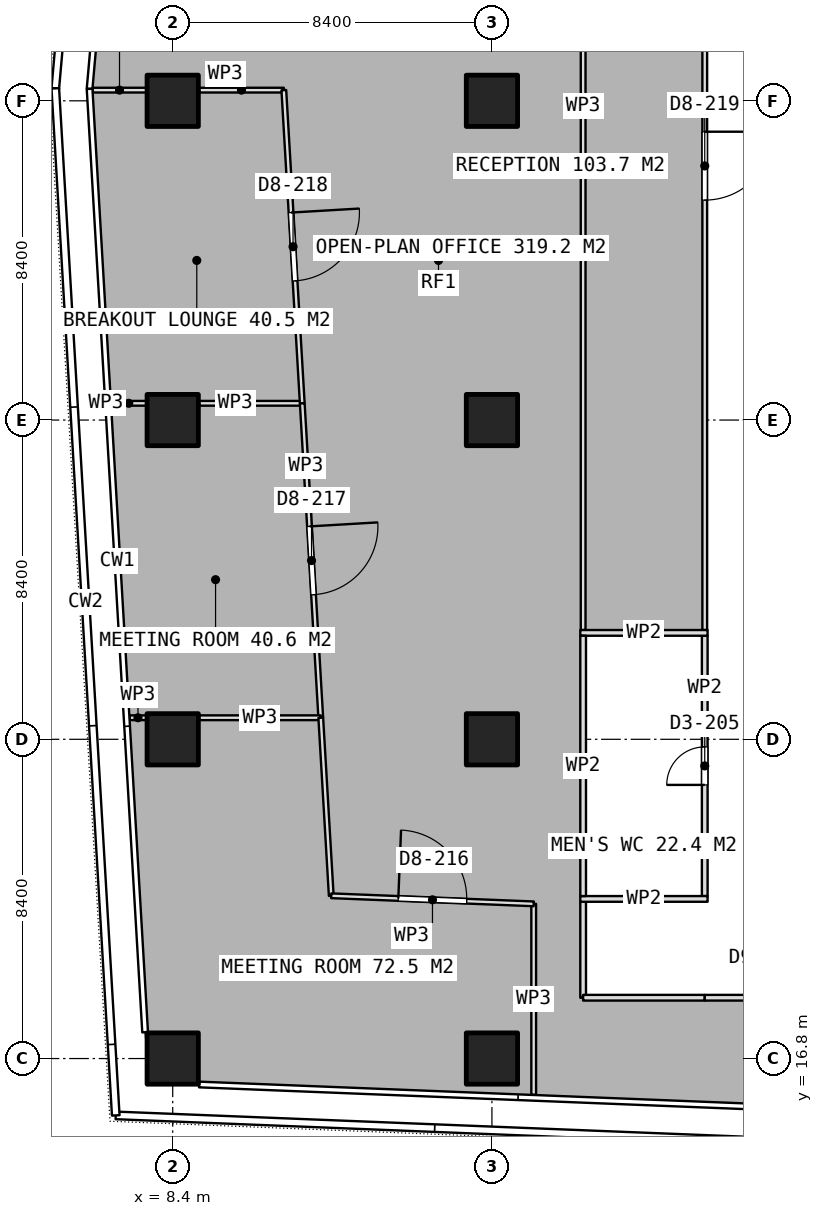
"""IFC4 building model, lengths in metres.
Left out: names, types, materials, properties, quantities, classifications, styles, units other than length and angle.
Written with IfcOpenShell. Run it as: python <this file> out.ifc"""

import sys

from ifc_helpers import new_model, si_unit, direction, frame, frame_2d, origin, origin_2d, place, context, subcontext, project, spatial, rectangle, extrude, element, fill, save


model = new_model("IFC4")
c1 = context("Model", 3, precision=1e-05, world=origin(), true_north=direction((0.0, 1.0)))
c2 = subcontext(c1, "Body", "Model", "MODEL_VIEW")
j1 = project(units=[si_unit("LENGTHUNIT", "METRE"), si_unit("PLANEANGLEUNIT", "RADIAN")], contexts=[c1])
p1 = place(None, origin())
s1 = spatial("IfcSite", under=j1, at=p1, CompositionType="ELEMENT")
p2 = place(p1, origin())
s2 = spatial("IfcBuilding", under=s1, at=p2, CompositionType="ELEMENT")
p3 = place(p2, frame((0.0, 0.0, 195.2)))
s3 = spatial("IfcBuildingStorey", under=s2, at=p3, CompositionType="ELEMENT", Elevation=195.2)
for number, where, z_axis, x_axis in (
    (1, (8.4, 16.8, 0.0), (0.0, 0.0, 1.0), (1.0, 0.0, 0.0)),
    (2, (8.4, 25.2, 0.0), (0.0, 0.0, 1.0), (1.0, 0.0, 0.0)),
    (3, (8.4, 33.6, 0.0), (0.0, 0.0, 1.0), (1.0, 0.0, 0.0)),
    (4, (8.4, 42.0, 0.0), (0.0, 0.0, 1.0), (1.0, 0.0, 0.0)),
    (5, (16.8, 16.8, 0.0), (0.0, 0.0, 1.0), (1.0, 0.0, 0.0)),
    (6, (16.8, 25.2, 0.0), (0.0, 0.0, 1.0), (1.0, 0.0, 0.0)),
    (7, (16.8, 33.6, 0.0), (0.0, 0.0, 1.0), (1.0, 0.0, 0.0)),
    (8, (16.8, 42.0, 0.0), (0.0, 0.0, 1.0), (1.0, 0.0, 0.0)),
):
    element("IfcColumn", number, at=place(p3, frame(where, z_axis=z_axis, x_axis=x_axis)), inside=s3, PredefinedType="COLUMN", context=c2, shape_type="SweptSolid", body=[
        extrude(rectangle(XDim=1.35, YDim=1.35, at=origin_2d()), origin(), (0.0, 0.0, 1.0), 3.75),
    ])
for number, where, z_axis, x_axis in (
    (9, (19.125, 21.0, 0.0), (0.0, 0.0, 1.0), (1.0, 0.0, 0.0)),
    (10, (19.125, 28.0, 0.0), (0.0, 0.0, 1.0), (1.0, 0.0, 0.0)),
):
    element("IfcWall", number, at=place(p3, frame(where, z_axis=z_axis, x_axis=x_axis)), inside=s3, PredefinedType="PARTITIONING", context=c2, shape_type="SweptSolid", body=[
        extrude(rectangle(XDim=3.35, YDim=0.15, at=frame_2d((1.675, 0.0))), origin(), (0.0, 0.0, 1.0), 3.5),
    ])
p4 = place(p3, frame((19.2, 21.075, 0.0), z_axis=(0.0, 0.0, 1.0), x_axis=(0.0, 1.0, 0.0)))
e11 = element("IfcWall", 11, at=p4, inside=s3, PredefinedType="PARTITIONING", context=c2, shape_type="SweptSolid", body=[
    extrude(rectangle(XDim=6.85, YDim=0.15, at=frame_2d((3.425, 0.0))), origin(), (0.0, 0.0, 1.0), 3.5),
])
p5 = place(p3, frame((22.4, 21.075, 0.0), z_axis=(0.0, 0.0, 1.0), x_axis=(0.0, 1.0, 0.0)))
e12 = element("IfcWall", 12, at=p5, inside=s3, PredefinedType="PARTITIONING", context=c2, shape_type="SweptSolid", body=[
    extrude(rectangle(XDim=6.85, YDim=0.15, at=frame_2d((3.425, 0.0))), origin(), (0.0, 0.0, 1.0), 3.5),
])
p6 = place(p5, frame((2.925, 0.0, 0.0)))
e13 = element("IfcOpeningElement", 13, at=p6, cuts=e12, PredefinedType="OPENING", context=c2, shape_type="SweptSolid", body=[
    extrude(rectangle(XDim=1.0, YDim=2.1, at=frame_2d((0.5, 1.05))), frame((0.0, 0.085, 0.0), z_axis=(0.0, -1.0, 0.0), x_axis=(1.0, 0.0, 0.0)), (0.0, 0.0, 1.0), 0.17),
])
p7 = place(p3, frame((11.809, 34.041, 0.0), z_axis=(0.0, 0.0, 1.0), x_axis=(-1.0, 0.0, 0.0)))
e14 = element("IfcWall", 14, at=p7, inside=s3, PredefinedType="PARTITIONING", context=c2, shape_type="SweptSolid", body=[
    extrude(rectangle(XDim=2.714, YDim=0.125, at=frame_2d((1.357, 0.0))), origin(), (0.0, 0.0, 1.0), 3.5),
])
p8 = place(p3, frame((7.705, 34.041, 0.0), z_axis=(0.0, 0.0, 1.0), x_axis=(-1.0, 0.0, 0.0)))
e15 = element("IfcWall", 15, at=p8, inside=s3, PredefinedType="PARTITIONING", context=c2, shape_type="SweptSolid", body=[
    extrude(rectangle(XDim=0.925, YDim=0.125, at=frame_2d((0.462, 0.0))), origin(), (0.0, 0.0, 1.0), 3.5),
])
p9 = place(p3, frame((6.295, 42.281, 0.0), z_axis=(0.0, 0.0, 1.0), x_axis=(1.0, 0.0, 0.0)))
e16 = element("IfcWall", 16, at=p9, inside=s3, PredefinedType="PARTITIONING", context=c2, shape_type="SweptSolid", body=[
    extrude(rectangle(XDim=1.41, YDim=0.125, at=frame_2d((0.705, 0.0))), origin(), (0.0, 0.0, 1.0), 3.5),
])
p10 = place(p3, frame((9.095, 42.281, 0.0), z_axis=(0.0, 0.0, 1.0), x_axis=(1.0, 0.0, 0.0)))
e17 = element("IfcWall", 17, at=p10, inside=s3, PredefinedType="PARTITIONING", context=c2, shape_type="SweptSolid", body=[
    extrude(rectangle(XDim=2.229, YDim=0.125, at=frame_2d((1.115, 0.0))), origin(), (0.0, 0.0, 1.0), 3.5),
])
p11 = place(p3, frame((11.324, 42.281, 0.0), z_axis=(0.0, 0.0, 1.0), x_axis=(0.058770569842, -0.998271516232, 0.0)))
e18 = element("IfcWall", 18, at=p11, inside=s3, PredefinedType="PARTITIONING", context=c2, shape_type="SweptSolid", body=[
    extrude(rectangle(XDim=8.254, YDim=0.125, at=frame_2d((4.127, 0.0))), origin(), (0.0, 0.0, 1.0), 3.5),
])
p12 = place(p11, frame((3.227, 0.0, 0.0)))
e19 = element("IfcOpeningElement", 19, at=p12, cuts=e18, PredefinedType="OPENING", context=c2, shape_type="SweptSolid", body=[
    extrude(rectangle(XDim=1.8, YDim=2.1, at=frame_2d((0.9, 1.05))), frame((0.0, 0.073, 0.0), z_axis=(0.0, -1.0, 0.0), x_axis=(1.0, 0.0, 0.0)), (0.0, 0.0, 1.0), 0.145),
])
p13 = place(p3, frame((11.809, 34.04, 0.0), z_axis=(0.0, 0.0, 1.0), x_axis=(0.058742745351, -0.998273153936, 0.0)))
e20 = element("IfcWall", 20, at=p13, inside=s3, PredefinedType="PARTITIONING", context=c2, shape_type="SweptSolid", body=[
    extrude(rectangle(XDim=8.287, YDim=0.125, at=frame_2d((4.144, 0.0))), origin(), (0.0, 0.0, 1.0), 3.5),
])
p14 = place(p13, frame((3.244, 0.0, 0.0)))
e21 = element("IfcOpeningElement", 21, at=p14, cuts=e20, PredefinedType="OPENING", context=c2, shape_type="SweptSolid", body=[
    extrude(rectangle(XDim=1.8, YDim=2.1, at=frame_2d((0.9, 1.05))), frame((0.0, 0.073, 0.0), z_axis=(0.0, -1.0, 0.0), x_axis=(1.0, 0.0, 0.0)), (0.0, 0.0, 1.0), 0.145),
])
p15 = place(p3, frame((12.296, 25.767, 0.0), z_axis=(0.0, 0.0, 1.0), x_axis=(-1.0, 0.0, 0.0)))
e22 = element("IfcWall", 22, at=p15, inside=s3, PredefinedType="PARTITIONING", context=c2, shape_type="SweptSolid", body=[
    extrude(rectangle(XDim=3.201, YDim=0.125, at=frame_2d((1.601, 0.0))), origin(), (0.0, 0.0, 1.0), 3.5),
])
p16 = place(p3, frame((7.705, 25.767, 0.0), z_axis=(0.0, 0.0, 1.0), x_axis=(-1.0, 0.0, 0.0)))
e23 = element("IfcWall", 23, at=p16, inside=s3, PredefinedType="PARTITIONING", context=c2, shape_type="SweptSolid", body=[
    extrude(rectangle(XDim=0.438, YDim=0.125, at=frame_2d((0.219, 0.0))), origin(), (0.0, 0.0, 1.0), 3.5),
])
p17 = place(p3, frame((17.899, 20.87, 0.0), z_axis=(0.0, 0.0, 1.0), x_axis=(0.0, -1.0, 0.0)))
e24 = element("IfcWall", 24, at=p17, inside=s3, PredefinedType="PARTITIONING", context=c2, shape_type="SweptSolid", body=[
    extrude(rectangle(XDim=5.024, YDim=0.125, at=frame_2d((2.512, 0.0))), origin(), (0.0, 0.0, 1.0), 3.5),
])
p18 = place(p3, frame((12.296, 25.766, 0.0), z_axis=(0.0, 0.0, 1.0), x_axis=(0.058859304142, -0.99826628828, 0.0)))
e25 = element("IfcWall", 25, at=p18, inside=s3, PredefinedType="PARTITIONING", context=c2, shape_type="SweptSolid", body=[
    extrude(rectangle(XDim=4.691, YDim=0.125, at=frame_2d((2.346, 0.0))), origin(), (0.0, 0.0, 1.0), 3.5),
])
p19 = place(p3, frame((12.572, 21.083, 0.0), z_axis=(0.0, 0.0, 1.0), x_axis=(0.999202348063, -0.039933289679, 0.0)))
e26 = element("IfcWall", 26, at=p19, inside=s3, PredefinedType="PARTITIONING", context=c2, shape_type="SweptSolid", body=[
    extrude(rectangle(XDim=5.331, YDim=0.125, at=frame_2d((2.666, 0.0))), origin(), (0.0, 0.0, 1.0), 3.5),
])
p20 = place(p19, frame((1.766, 0.0, 0.0)))
e27 = element("IfcOpeningElement", 27, at=p20, cuts=e26, PredefinedType="OPENING", context=c2, shape_type="SweptSolid", body=[
    extrude(rectangle(XDim=1.8, YDim=2.1, at=frame_2d((0.9, 1.05))), frame((0.0, 0.073, 0.0), z_axis=(0.0, -1.0, 0.0), x_axis=(1.0, 0.0, 0.0)), (0.0, 0.0, 1.0), 0.145),
])
p21 = place(p3, frame((22.4, 52.575, 0.0), z_axis=(0.0, 0.0, 1.0), x_axis=(0.0, -1.0, 0.0)))
e28 = element("IfcWall", 28, at=p21, inside=s3, PredefinedType="PARTITIONING", context=c2, shape_type="SweptSolid", body=[
    extrude(rectangle(XDim=24.5, YDim=0.125, at=frame_2d((12.25, 0.0))), origin(), (0.0, 0.0, 1.0), 3.5),
])
p22 = place(p21, frame((11.388, 0.0, 0.0)))
e29 = element("IfcOpeningElement", 29, at=p22, cuts=e28, PredefinedType="OPENING", context=c2, shape_type="SweptSolid", body=[
    extrude(rectangle(XDim=1.8, YDim=2.1, at=frame_2d((0.9, 1.05))), frame((0.0, 0.073, 0.0), z_axis=(0.0, -1.0, 0.0), x_axis=(1.0, 0.0, 0.0)), (0.0, 0.0, 1.0), 0.145),
])
p23 = place(p3, frame((19.2, 28.075, 0.0), z_axis=(0.0, 0.0, 1.0), x_axis=(0.0, 1.0, 0.0)))
e30 = element("IfcWall", 30, at=p23, inside=s3, PredefinedType="PARTITIONING", context=c2, shape_type="SweptSolid", body=[
    extrude(rectangle(XDim=27.602, YDim=0.125, at=frame_2d((13.801, 0.0))), origin(), (0.0, 0.0, 1.0), 3.5),
])
p24 = place(p3, frame((19.2, 20.925, 0.0), z_axis=(0.0, 0.0, 1.0), x_axis=(0.0, -1.0, 0.0)))
e31 = element("IfcWall", 31, at=p24, inside=s3, PredefinedType="PARTITIONING", context=c2, shape_type="SweptSolid", body=[
    extrude(rectangle(XDim=2.525, YDim=0.15, at=frame_2d((1.263, 0.0))), origin(), (0.0, 0.0, 1.0), 3.5),
])
p25 = place(p3, frame((19.2, 18.4, 0.0), z_axis=(0.0, 0.0, 1.0), x_axis=(1.0, 0.0, 0.0)))
e32 = element("IfcWall", 32, at=p25, inside=s3, PredefinedType="PARTITIONING", context=c2, shape_type="SweptSolid", body=[
    extrude(rectangle(XDim=3.2, YDim=0.15, at=frame_2d((1.6, 0.0))), origin(), (0.0, 0.0, 1.0), 3.5),
])
p26 = place(p3, frame((22.4, 18.4, 0.0), z_axis=(0.0, 0.0, 1.0), x_axis=(1.0, 0.0, 0.0)))
e33 = element("IfcWall", 33, at=p26, inside=s3, PredefinedType="PARTITIONING", context=c2, shape_type="SweptSolid", body=[
    extrude(rectangle(XDim=4.303, YDim=0.15, at=frame_2d((2.151, 0.0))), origin(), (0.0, 0.0, 1.0), 3.5),
])
p27 = place(p26, frame((1.052, 0.0, 0.0)))
e34 = element("IfcOpeningElement", 34, at=p27, cuts=e33, PredefinedType="OPENING", context=c2, shape_type="SweptSolid", body=[
    extrude(rectangle(XDim=1.0, YDim=2.1, at=frame_2d((0.5, 1.05))), frame((0.0, 0.085, 0.0), z_axis=(0.0, -1.0, 0.0), x_axis=(1.0, 0.0, 0.0)), (0.0, 0.0, 1.0), 0.17),
])
p28 = place(p6, origin())
e35 = element("IfcDoor", 35, at=p28, inside=s3, OperationType="SINGLE_SWING_LEFT", PredefinedType="DOOR", context=c2, shape_type="SweptSolid", body=[
    extrude(rectangle(XDim=1.0, YDim=2.1, at=frame_2d((0.5, 1.05))), frame((0.0, 0.025, 0.0), z_axis=(0.0, -1.0, 0.0), x_axis=(1.0, 0.0, 0.0)), (0.0, 0.0, 1.0), 0.05),
])
fill(e13, e35)
p29 = place(p12, origin())
e36 = element("IfcDoor", 36, at=p29, inside=s3, OperationType="DOUBLE_DOOR_SINGLE_SWING", PredefinedType="DOOR", context=c2, shape_type="SweptSolid", body=[
    extrude(rectangle(XDim=1.8, YDim=2.1, at=frame_2d((0.9, 1.05))), frame((0.0, 0.025, 0.0), z_axis=(0.0, -1.0, 0.0), x_axis=(1.0, 0.0, 0.0)), (0.0, 0.0, 1.0), 0.05),
])
fill(e19, e36)
p30 = place(p14, origin())
e37 = element("IfcDoor", 37, at=p30, inside=s3, OperationType="DOUBLE_DOOR_SINGLE_SWING", PredefinedType="DOOR", context=c2, shape_type="SweptSolid", body=[
    extrude(rectangle(XDim=1.8, YDim=2.1, at=frame_2d((0.9, 1.05))), frame((0.0, 0.025, 0.0), z_axis=(0.0, -1.0, 0.0), x_axis=(1.0, 0.0, 0.0)), (0.0, 0.0, 1.0), 0.05),
])
fill(e21, e37)
p31 = place(p20, origin())
e38 = element("IfcDoor", 38, at=p31, inside=s3, OperationType="DOUBLE_DOOR_SINGLE_SWING", PredefinedType="DOOR", context=c2, shape_type="SweptSolid", body=[
    extrude(rectangle(XDim=1.8, YDim=2.1, at=frame_2d((0.9, 1.05))), frame((0.0, 0.025, 0.0), z_axis=(0.0, -1.0, 0.0), x_axis=(1.0, 0.0, 0.0)), (0.0, 0.0, 1.0), 0.05),
])
fill(e27, e38)
p32 = place(p22, origin())
e39 = element("IfcDoor", 39, at=p32, inside=s3, OperationType="DOUBLE_DOOR_SINGLE_SWING", PredefinedType="DOOR", context=c2, shape_type="SweptSolid", body=[
    extrude(rectangle(XDim=1.8, YDim=2.1, at=frame_2d((0.9, 1.05))), frame((0.0, 0.025, 0.0), z_axis=(0.0, -1.0, 0.0), x_axis=(1.0, 0.0, 0.0)), (0.0, 0.0, 1.0), 0.05),
])
fill(e29, e39)
save(model, sys.argv[1])
